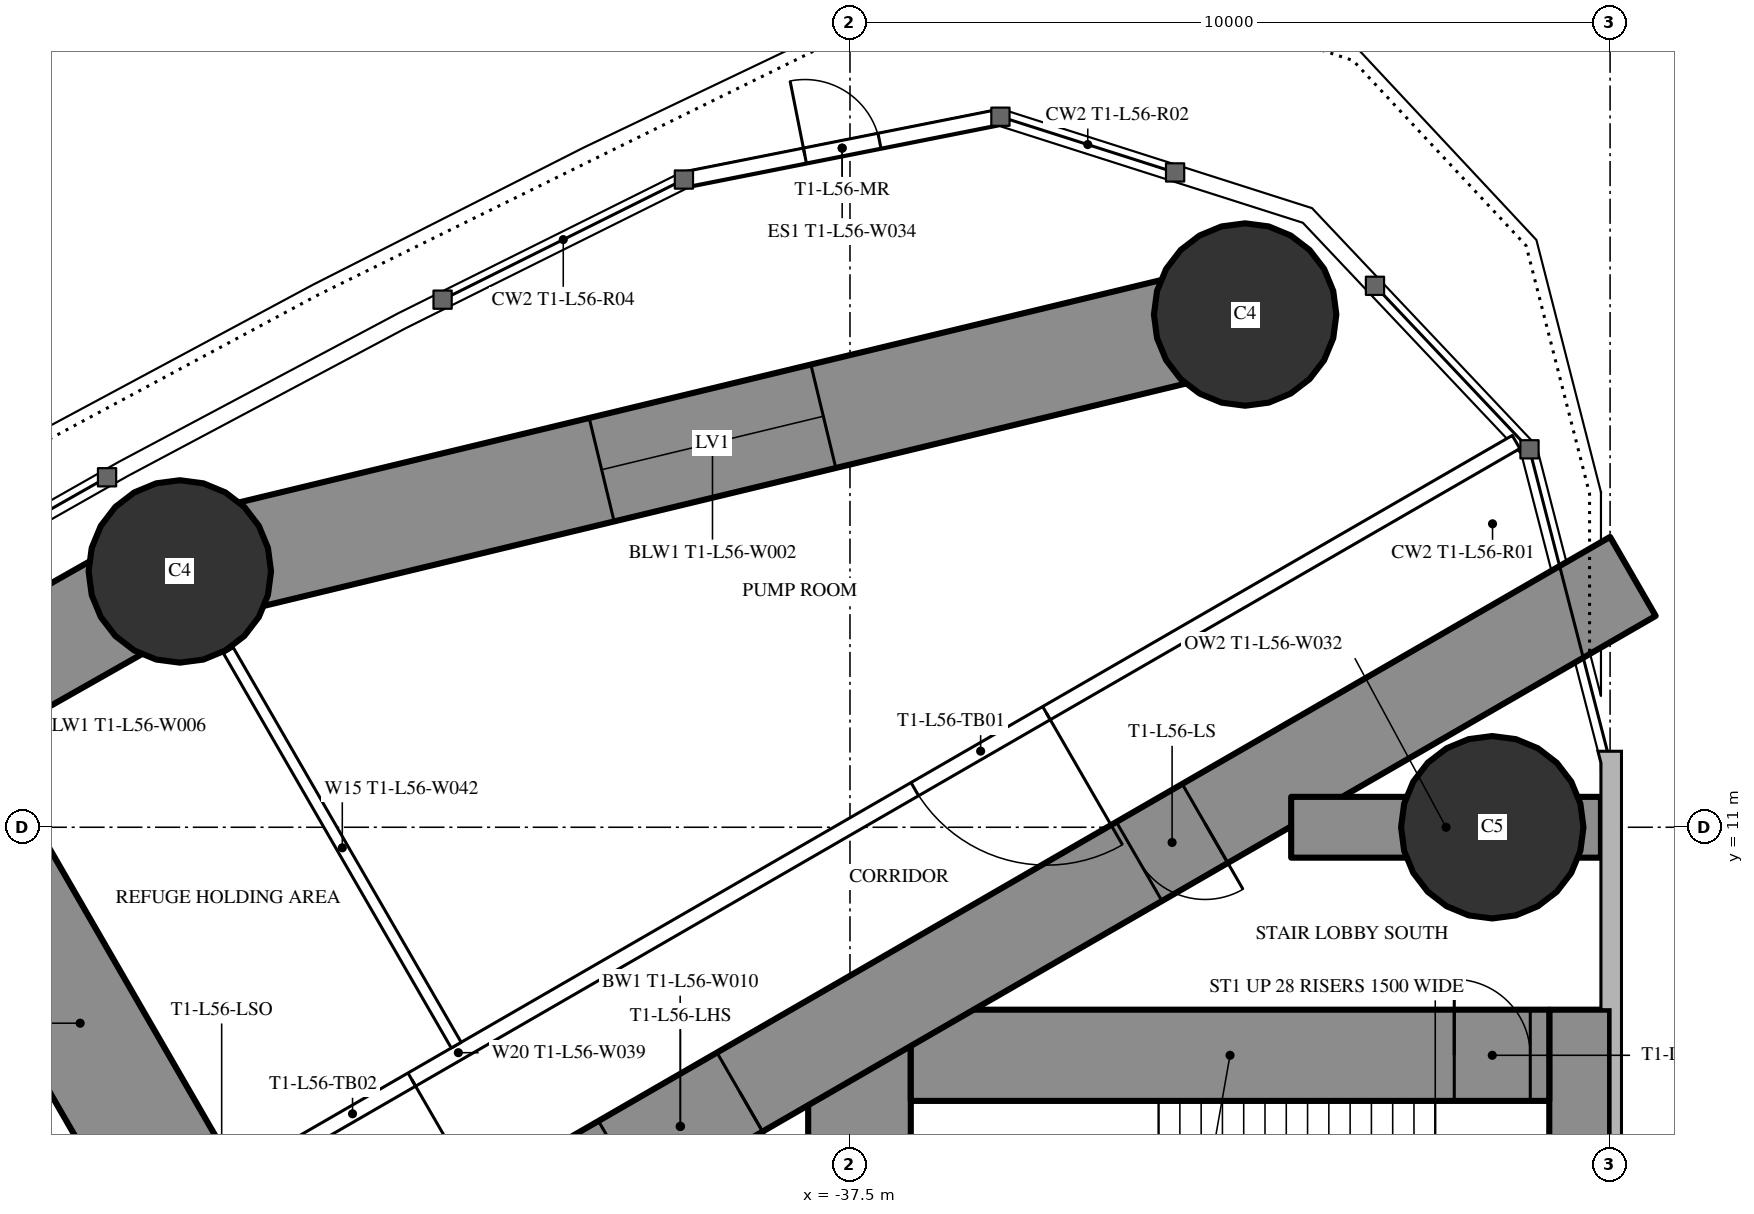
"""IFC4 building model, lengths in metres.
Left out: names, types, materials, properties, quantities, classifications, styles, units other than length and angle.
Written with IfcOpenShell. Run it as: python <this file> out.ifc"""

import sys

from ifc_helpers import new_model, si_unit, direction, frame, frame_2d, origin, origin_2d, place, context, subcontext, project, spatial, rectangle, circle, hollow_circle, extrude, element, fill, save


model = new_model("IFC4")
c1 = context("Model", 3, precision=1e-05, world=origin(), true_north=direction((0.0, 1.0)))
c2 = subcontext(c1, "Body", "Model", "MODEL_VIEW")
j1 = project(units=[si_unit("LENGTHUNIT", "METRE"), si_unit("PLANEANGLEUNIT", "RADIAN")], contexts=[c1])
p1 = place(None, origin())
s1 = spatial("IfcSite", under=j1, at=p1, CompositionType="ELEMENT")
p2 = place(p1, origin())
s2 = spatial("IfcBuilding", under=s1, at=p2, CompositionType="ELEMENT")
p3 = place(p2, frame((0.0, 0.0, 210.3)))
s3 = spatial("IfcBuildingStorey", under=s2, at=p3, CompositionType="ELEMENT", Elevation=210.3)
p4 = place(p3, frame((-32.301, 17.745, 0.0), z_axis=(0.0, 0.0, 1.0), x_axis=(1.0, 0.0, 0.0)))
e1 = element("IfcColumn", 1, at=p4, inside=s3, PredefinedType="COLUMN", context=c2, shape_type="SweptSolid", body=[
    extrude(circle(Radius=1.2, at=origin_2d()), origin(), (0.0, 0.0, 1.0), 5.0),
])
p5 = place(p3, frame((-29.05, 11.0, 0.0), z_axis=(0.0, 0.0, 1.0), x_axis=(1.0, 0.0, 0.0)))
e2 = element("IfcColumn", 2, at=p5, inside=s3, PredefinedType="COLUMN", context=c2, shape_type="SweptSolid", body=[
    extrude(hollow_circle(Radius=1.2, WallThickness=0.09, at=origin_2d()), origin(), (0.0, 0.0, 1.0), 5.0),
])
p6 = place(p3, frame((-46.317, 14.365, 0.0), z_axis=(0.0, 0.0, 1.0), x_axis=(1.0, 0.0, 0.0)))
e3 = element("IfcColumn", 3, at=p6, inside=s3, PredefinedType="COLUMN", context=c2, shape_type="SweptSolid", body=[
    extrude(circle(Radius=1.2, at=origin_2d()), origin(), (0.0, 0.0, 1.0), 5.0),
])
p7 = place(p3, frame((-27.9, 8.6, 0.0), z_axis=(0.0, 0.0, 1.0), x_axis=(0.0, -1.0, 0.0)))
e4 = element("IfcWall", 4, at=p7, inside=s3, PredefinedType="SHEAR", context=c2, shape_type="SweptSolid", body=[
    extrude(rectangle(XDim=17.2, YDim=0.8, at=frame_2d((8.6, 0.0))), origin(), (0.0, 0.0, 1.0), 5.0),
])
p8 = place(p7, frame((6.95, 0.0, 0.0)))
e5 = element("IfcOpeningElement", 5, at=p8, cuts=e4, PredefinedType="OPENING", context=c2, shape_type="SweptSolid", body=[
    extrude(rectangle(XDim=0.9, YDim=2.2, at=frame_2d((0.45, 1.1))), frame((0.0, 0.41, 0.0), z_axis=(0.0, -1.0, 0.0), x_axis=(1.0, 0.0, 0.0)), (0.0, 0.0, 1.0), 0.82),
])
p9 = place(p3, frame((-37.375, 8.6, 0.0), z_axis=(0.0, 0.0, 1.0), x_axis=(0.0, -1.0, 0.0)))
e6 = element("IfcWall", 6, at=p9, inside=s3, PredefinedType="SHEAR", context=c2, shape_type="SweptSolid", body=[
    extrude(rectangle(XDim=17.2, YDim=1.35, at=frame_2d((8.6, 0.0))), origin(), (0.0, 0.0, 1.0), 5.0),
])
p10 = place(p9, frame((7.7, 0.0, 0.0)))
e7 = element("IfcOpeningElement", 7, at=p10, cuts=e6, PredefinedType="OPENING", context=c2, shape_type="SweptSolid", body=[
    extrude(rectangle(XDim=1.8, YDim=2.2, at=frame_2d((0.9, 1.1))), frame((0.0, 0.685, 0.0), z_axis=(0.0, -1.0, 0.0), x_axis=(1.0, 0.0, 0.0)), (0.0, 0.0, 1.0), 1.37),
])
p11 = place(p3, frame((-28.3, 8.0, 0.0), z_axis=(0.0, 0.0, 1.0), x_axis=(-1.0, 0.0, 0.0)))
e8 = element("IfcWall", 8, at=p11, inside=s3, PredefinedType="SHEAR", context=c2, shape_type="SweptSolid", body=[
    extrude(rectangle(XDim=8.4, YDim=1.2, at=frame_2d((4.2, 0.0))), origin(), (0.0, 0.0, 1.0), 5.0),
])
p12 = place(p11, frame((0.25, 0.0, 0.0)))
e9 = element("IfcOpeningElement", 9, at=p12, cuts=e8, PredefinedType="OPENING", context=c2, shape_type="SweptSolid", body=[
    extrude(rectangle(XDim=1.0, YDim=2.2, at=frame_2d((0.5, 1.1))), frame((0.0, 0.61, 0.0), z_axis=(0.0, -1.0, 0.0), x_axis=(1.0, 0.0, 0.0)), (0.0, 0.0, 1.0), 1.22),
])
p13 = place(p3, frame((-27.2, 14.3, 0.0), z_axis=(0.0, 0.0, 1.0), x_axis=(-0.866026593062, -0.499997940104, 0.0)))
e10 = element("IfcWall", 10, at=p13, inside=s3, PredefinedType="SHEAR", context=c2, shape_type="SweptSolid", body=[
    extrude(rectangle(XDim=28.946, YDim=1.2, at=frame_2d((14.473, 0.0))), origin(), (0.0, 0.0, 1.0), 5.0),
])
p14 = place(p13, frame((6.5, 0.0, 0.0)))
e11 = element("IfcOpeningElement", 11, at=p14, cuts=e10, PredefinedType="OPENING", context=c2, shape_type="SweptSolid", body=[
    extrude(rectangle(XDim=1.0, YDim=2.2, at=frame_2d((0.5, 1.1))), frame((0.0, 0.61, 0.0), z_axis=(0.0, -1.0, 0.0), x_axis=(1.0, 0.0, 0.0)), (0.0, 0.0, 1.0), 1.22),
])
p15 = place(p13, frame((13.568, 0.0, 0.0)))
e12 = element("IfcOpeningElement", 12, at=p15, cuts=e10, PredefinedType="OPENING", context=c2, shape_type="SweptSolid", body=[
    extrude(rectangle(XDim=1.8, YDim=2.2, at=frame_2d((0.9, 1.1))), frame((0.0, 0.61, 0.0), z_axis=(0.0, -1.0, 0.0), x_axis=(1.0, 0.0, 0.0)), (0.0, 0.0, 1.0), 1.22),
])
p16 = place(p3, frame((-27.62, 11.0, 0.0), z_axis=(0.0, 0.0, 1.0), x_axis=(-1.0, 0.0, 0.0)))
e13 = element("IfcWall", 13, at=p16, inside=s3, PredefinedType="SHEAR", context=c2, shape_type="SweptSolid", body=[
    extrude(rectangle(XDim=4.076, YDim=0.8, at=frame_2d((2.038, 0.0))), origin(), (0.0, 0.0, 1.0), 5.0),
])
p17 = place(p3, frame((-45.366, 4.504, 0.0), z_axis=(0.0, 0.0, 1.0), x_axis=(-0.499998848701, 0.866026068486, 0.0)))
e14 = element("IfcWall", 14, at=p17, inside=s3, PredefinedType="SHEAR", context=c2, shape_type="SweptSolid", body=[
    extrude(rectangle(XDim=9.048, YDim=1.6, at=frame_2d((4.524, 0.0))), origin(), (0.0, 0.0, 1.0), 5.0),
])
p18 = place(p17, frame((0.3, 0.0, 0.0)))
e15 = element("IfcOpeningElement", 15, at=p18, cuts=e14, PredefinedType="OPENING", context=c2, shape_type="SweptSolid", body=[
    extrude(rectangle(XDim=1.0, YDim=2.2, at=frame_2d((0.5, 1.1))), frame((0.0, 0.81, 0.0), z_axis=(0.0, -1.0, 0.0), x_axis=(1.0, 0.0, 0.0)), (0.0, 0.0, 1.0), 1.62),
])
p19 = place(p3, frame((-32.301, 17.745, 0.0), z_axis=(0.0, 0.0, 1.0), x_axis=(-0.972132796948, -0.234430853556, 0.0)))
e16 = element("IfcWall", 16, at=p19, inside=s3, PredefinedType="SHEAR", context=c2, shape_type="SweptSolid", body=[
    extrude(rectangle(XDim=14.417, YDim=1.4, at=frame_2d((7.209, 0.0))), origin(), (0.0, 0.0, 1.0), 5.0),
])
p20 = place(p19, frame((5.709, 0.0, 0.6)))
e17 = element("IfcOpeningElement", 17, at=p20, cuts=e16, PredefinedType="OPENING", context=c2, shape_type="SweptSolid", body=[
    extrude(rectangle(XDim=3.0, YDim=1.2, at=frame_2d((1.5, 0.6))), frame((0.0, 0.71, 0.0), z_axis=(0.0, -1.0, 0.0), x_axis=(1.0, 0.0, 0.0)), (0.0, 0.0, 1.0), 1.42),
])
p21 = place(p3, frame((-46.317, 14.365, 0.0), z_axis=(0.0, 0.0, 1.0), x_axis=(-0.869978841992, -0.493089053301, 0.0)))
e18 = element("IfcWall", 18, at=p21, inside=s3, PredefinedType="SHEAR", context=c2, shape_type="SweptSolid", body=[
    extrude(rectangle(XDim=4.108, YDim=1.4, at=frame_2d((2.054, 0.0))), origin(), (0.0, 0.0, 1.0), 5.0),
])
p22 = place(p3, frame((-39.685, 19.521, 0.0), z_axis=(0.0, 0.0, 1.0), x_axis=(0.980858378754, 0.194722471298, 0.0)))
e19 = element("IfcWall", 19, at=p22, inside=s3, PredefinedType="STANDARD", context=c2, shape_type="SweptSolid", body=[
    extrude(rectangle(XDim=4.245, YDim=0.2, at=frame_2d((2.123, 0.0))), origin(), (0.0, 0.0, 1.0), 4.75),
])
p23 = place(p22, frame((1.623, 0.0, 0.0)))
e20 = element("IfcOpeningElement", 20, at=p23, cuts=e19, PredefinedType="OPENING", context=c2, shape_type="SweptSolid", body=[
    extrude(rectangle(XDim=1.0, YDim=2.2, at=frame_2d((0.5, 1.1))), frame((0.0, 0.11, 0.0), z_axis=(0.0, -1.0, 0.0), x_axis=(1.0, 0.0, 0.0)), (0.0, 0.0, 1.0), 0.22),
])
p24 = place(p3, frame((-28.737, 16.068, 0.0), z_axis=(0.0, 0.0, 1.0), x_axis=(-0.866026057212, -0.499998868229, 0.0)))
e21 = element("IfcWall", 21, at=p24, inside=s3, PredefinedType="PARTITIONING", context=c2, shape_type="SweptSolid", body=[
    extrude(rectangle(XDim=32.137, YDim=0.2, at=frame_2d((16.068, 0.0))), origin(), (0.0, 0.0, 1.0), 4.75),
])
p25 = place(p24, frame((7.134, 0.0, 0.0)))
e22 = element("IfcOpeningElement", 22, at=p25, cuts=e21, PredefinedType="OPENING", context=c2, shape_type="SweptSolid", body=[
    extrude(rectangle(XDim=2.0, YDim=2.4, at=frame_2d((1.0, 1.2))), frame((0.0, 0.11, 0.0), z_axis=(0.0, -1.0, 0.0), x_axis=(1.0, 0.0, 0.0)), (0.0, 0.0, 1.0), 0.22),
])
p26 = place(p24, frame((16.776, 0.0, 0.0)))
e23 = element("IfcOpeningElement", 23, at=p26, cuts=e21, PredefinedType="OPENING", context=c2, shape_type="SweptSolid", body=[
    extrude(rectangle(XDim=1.8, YDim=2.2, at=frame_2d((0.9, 1.1))), frame((0.0, 0.11, 0.0), z_axis=(0.0, -1.0, 0.0), x_axis=(1.0, 0.0, 0.0)), (0.0, 0.0, 1.0), 0.22),
])
p27 = place(p24, frame((21.799, 0.0, 0.0)))
e24 = element("IfcOpeningElement", 24, at=p27, cuts=e21, PredefinedType="OPENING", context=c2, shape_type="SweptSolid", body=[
    extrude(rectangle(XDim=1.8, YDim=2.2, at=frame_2d((0.9, 1.1))), frame((0.0, 0.11, 0.0), z_axis=(0.0, -1.0, 0.0), x_axis=(1.0, 0.0, 0.0)), (0.0, 0.0, 1.0), 0.22),
])
p28 = place(p24, frame((26.575, 0.0, 0.0)))
e25 = element("IfcOpeningElement", 25, at=p28, cuts=e21, PredefinedType="OPENING", context=c2, shape_type="SweptSolid", body=[
    extrude(rectangle(XDim=1.8, YDim=2.2, at=frame_2d((0.9, 1.1))), frame((0.0, 0.11, 0.0), z_axis=(0.0, -1.0, 0.0), x_axis=(1.0, 0.0, 0.0)), (0.0, 0.0, 1.0), 0.22),
])
p29 = place(p3, frame((-42.68, 8.134, 0.0), z_axis=(0.0, 0.0, 1.0), x_axis=(-0.499984479505, 0.866034364361, 0.0)))
e26 = element("IfcWall", 26, at=p29, inside=s3, PredefinedType="PARTITIONING", context=c2, shape_type="SweptSolid", body=[
    extrude(rectangle(XDim=5.995, YDim=0.15, at=frame_2d((2.998, 0.0))), origin(), (0.0, 0.0, 1.0), 3.85),
])
p30 = place(p20, origin())
e27 = element("IfcWindow", 27, at=p30, inside=s3, PartitioningType="SINGLE_PANEL", PredefinedType="WINDOW", context=c2, shape_type="SweptSolid", body=[
    extrude(rectangle(XDim=3.0, YDim=1.2, at=frame_2d((1.5, 0.6))), frame((0.0, 0.03, 0.0), z_axis=(0.0, -1.0, 0.0), x_axis=(1.0, 0.0, 0.0)), (0.0, 0.0, 1.0), 0.06),
])
fill(e17, e27)
p31 = place(p23, origin())
e28 = element("IfcDoor", 28, at=p31, inside=s3, OperationType="SINGLE_SWING_LEFT", PredefinedType="DOOR", context=c2, shape_type="SweptSolid", body=[
    extrude(rectangle(XDim=1.0, YDim=2.2, at=frame_2d((0.5, 1.1))), frame((0.0, 0.025, 0.0), z_axis=(0.0, -1.0, 0.0), x_axis=(1.0, 0.0, 0.0)), (0.0, 0.0, 1.0), 0.05),
])
fill(e20, e28)
p32 = place(p25, origin())
e29 = element("IfcDoor", 29, at=p32, inside=s3, OperationType="DOUBLE_DOOR_SINGLE_SWING", PredefinedType="DOOR", context=c2, shape_type="SweptSolid", body=[
    extrude(rectangle(XDim=2.0, YDim=2.4, at=frame_2d((1.0, 1.2))), frame((0.0, 0.025, 0.0), z_axis=(0.0, -1.0, 0.0), x_axis=(1.0, 0.0, 0.0)), (0.0, 0.0, 1.0), 0.05),
])
fill(e22, e29)
p33 = place(p26, origin())
e30 = element("IfcDoor", 30, at=p33, inside=s3, OperationType="DOUBLE_DOOR_SINGLE_SWING", PredefinedType="DOOR", context=c2, shape_type="SweptSolid", body=[
    extrude(rectangle(XDim=1.8, YDim=2.2, at=frame_2d((0.9, 1.1))), frame((0.0, 0.025, 0.0), z_axis=(0.0, -1.0, 0.0), x_axis=(1.0, 0.0, 0.0)), (0.0, 0.0, 1.0), 0.05),
])
fill(e23, e30)
p34 = place(p14, origin())
e31 = element("IfcDoor", 31, at=p34, inside=s3, OperationType="SINGLE_SWING_LEFT", PredefinedType="DOOR", context=c2, shape_type="SweptSolid", body=[
    extrude(rectangle(XDim=1.0, YDim=2.2, at=frame_2d((0.5, 1.1))), frame((0.0, 0.025, 0.0), z_axis=(0.0, -1.0, 0.0), x_axis=(1.0, 0.0, 0.0)), (0.0, 0.0, 1.0), 0.05),
])
fill(e11, e31)
p35 = place(p15, origin())
e32 = element("IfcDoor", 32, at=p35, inside=s3, OperationType="DOUBLE_DOOR_SINGLE_SWING", PredefinedType="DOOR", context=c2, shape_type="SweptSolid", body=[
    extrude(rectangle(XDim=1.8, YDim=2.2, at=frame_2d((0.9, 1.1))), frame((0.0, 0.025, 0.0), z_axis=(0.0, -1.0, 0.0), x_axis=(1.0, 0.0, 0.0)), (0.0, 0.0, 1.0), 0.05),
])
fill(e12, e32)
p36 = place(p12, origin())
e33 = element("IfcDoor", 33, at=p36, inside=s3, OperationType="SINGLE_SWING_RIGHT", PredefinedType="DOOR", context=c2, shape_type="SweptSolid", body=[
    extrude(rectangle(XDim=1.0, YDim=2.2, at=frame_2d((0.5, 1.1))), frame((0.0, 0.025, 0.0), z_axis=(0.0, -1.0, 0.0), x_axis=(1.0, 0.0, 0.0)), (0.0, 0.0, 1.0), 0.05),
])
fill(e9, e33)
save(model, sys.argv[1])
